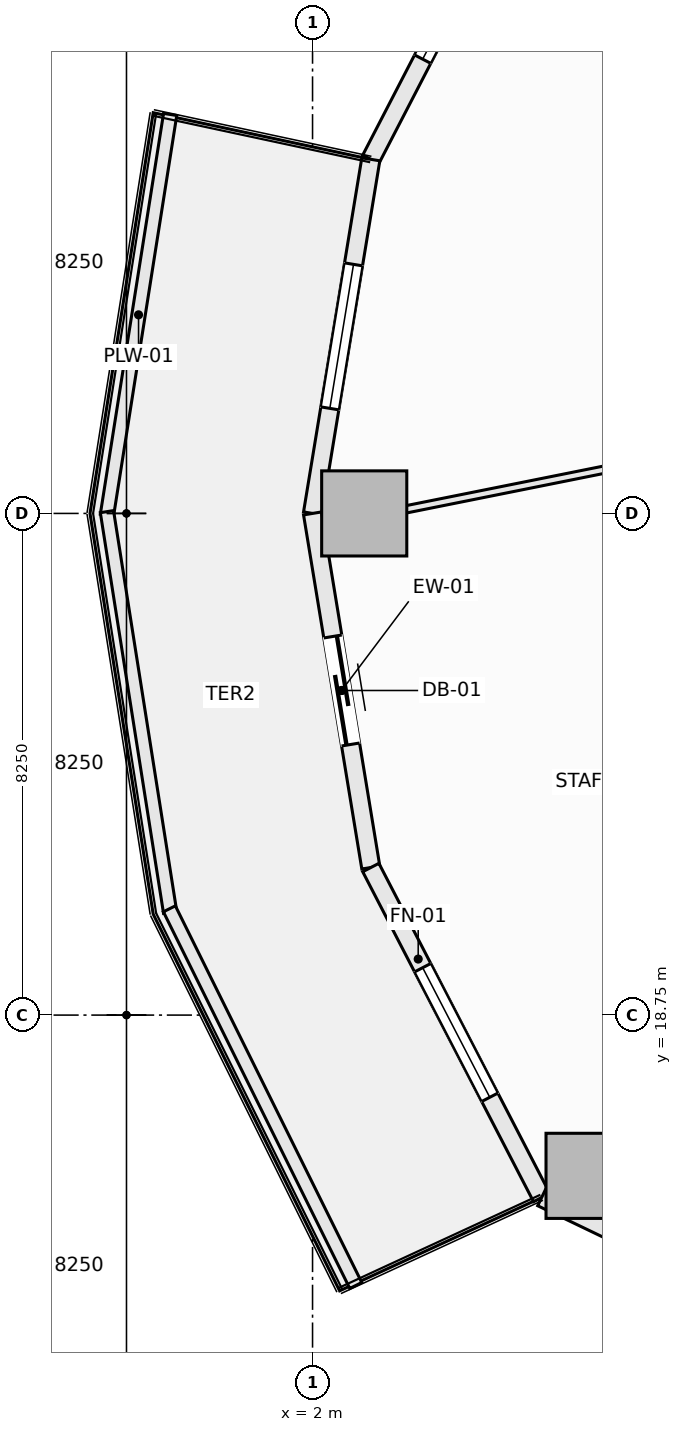
"""IFC4 building model, lengths in metres.
Left out: names, types, materials, properties, quantities, classifications, styles, units other than length and angle.
Written with IfcOpenShell. Run it as: python <this file> out.ifc"""

import sys

from ifc_helpers import new_model, si_unit, direction, frame, frame_2d, origin, origin_2d, place, context, subcontext, project, spatial, rectangle, extrude, element, fill, save


model = new_model("IFC4")
c1 = context("Model", 3, precision=1e-05, world=origin(), true_north=direction((0.0, 1.0)))
c2 = subcontext(c1, "Body", "Model", "MODEL_VIEW")
j1 = project(units=[si_unit("LENGTHUNIT", "METRE"), si_unit("PLANEANGLEUNIT", "RADIAN")], contexts=[c1])
p1 = place(None, origin())
s1 = spatial("IfcSite", under=j1, at=p1, CompositionType="ELEMENT")
p2 = place(p1, origin())
s2 = spatial("IfcBuilding", under=s1, at=p2, CompositionType="ELEMENT")
p3 = place(p2, frame((0.0, 0.0, 49.6)))
s3 = spatial("IfcBuildingStorey", under=s2, at=p3, CompositionType="ELEMENT", Elevation=49.6)
for number, where, z_axis, x_axis in (
    (1, (2.85, 27.0, -0.28), (0.0, 0.0, 1.0), (1.0, 0.0, 0.0)),
    (2, (6.54, 16.106, -0.28), (0.0, 0.0, 1.0), (1.0, 0.0, 0.0)),
):
    element("IfcColumn", number, at=place(p3, frame(where, z_axis=z_axis, x_axis=x_axis)), inside=s3, PredefinedType="COLUMN", context=c2, shape_type="SweptSolid", body=[
        extrude(rectangle(XDim=1.4, YDim=1.4, at=origin_2d()), origin(), (0.0, 0.0, 1.0), 3.85),
    ])
p4 = place(p3, frame((2.958, 32.823, 0.0), z_axis=(0.0, 0.0, 1.0), x_axis=(0.459809804413, 0.88801742312, 0.0)))
e3 = element("IfcWall", 3, at=p4, inside=s3, PredefinedType="SOLIDWALL", context=c2, shape_type="SweptSolid", body=[
    extrude(rectangle(XDim=6.111, YDim=0.3, at=frame_2d((3.055, 0.0))), origin(), (0.0, 0.0, 1.0), 3.093),
])
p5 = place(p4, frame((1.855, 0.0, 0.85)))
e4 = element("IfcOpeningElement", 4, at=p5, cuts=e3, PredefinedType="OPENING", context=c2, shape_type="SweptSolid", body=[
    extrude(rectangle(XDim=2.4, YDim=1.9, at=frame_2d((1.2, 0.95))), frame((0.0, 0.16, 0.0), z_axis=(0.0, -1.0, 0.0), x_axis=(1.0, 0.0, 0.0)), (0.0, 0.0, 1.0), 0.32),
])
p6 = place(p3, frame((2.0, 27.0, 0.0), z_axis=(0.0, 0.0, 1.0), x_axis=(0.162366057843, 0.98673059305, 0.0)))
e5 = element("IfcWall", 5, at=p6, inside=s3, PredefinedType="SOLIDWALL", context=c2, shape_type="SweptSolid", body=[
    extrude(rectangle(XDim=5.902, YDim=0.3, at=frame_2d((2.951, 0.0))), origin(), (0.0, 0.0, 1.0), 3.093),
])
p7 = place(p6, frame((1.751, 0.0, 0.85)))
e6 = element("IfcOpeningElement", 6, at=p7, cuts=e5, PredefinedType="OPENING", context=c2, shape_type="SweptSolid", body=[
    extrude(rectangle(XDim=2.4, YDim=1.9, at=frame_2d((1.2, 0.95))), frame((0.0, 0.16, 0.0), z_axis=(0.0, -1.0, 0.0), x_axis=(1.0, 0.0, 0.0)), (0.0, 0.0, 1.0), 0.32),
])
p8 = place(p3, frame((2.0, 27.0, 0.0), z_axis=(0.0, 0.0, 1.0), x_axis=(0.162366057843, -0.98673059305, 0.0)))
e7 = element("IfcWall", 7, at=p8, inside=s3, PredefinedType="SOLIDWALL", context=c2, shape_type="SweptSolid", body=[
    extrude(rectangle(XDim=5.902, YDim=0.3, at=frame_2d((2.951, 0.0))), origin(), (0.0, 0.0, 1.0), 3.093),
])
p9 = place(p8, frame((2.051, 0.0, 0.0)))
e8 = element("IfcOpeningElement", 8, at=p9, cuts=e7, PredefinedType="OPENING", context=c2, shape_type="SweptSolid", body=[
    extrude(rectangle(XDim=1.8, YDim=2.25, at=frame_2d((0.9, 1.125))), frame((0.0, 0.16, 0.0), z_axis=(0.0, -1.0, 0.0), x_axis=(1.0, 0.0, 0.0)), (0.0, 0.0, 1.0), 0.32),
])
p10 = place(p3, frame((2.958, 21.177, 0.0), z_axis=(0.0, 0.0, 1.0), x_axis=(0.459809804413, -0.88801742312, 0.0)))
e9 = element("IfcWall", 9, at=p10, inside=s3, PredefinedType="SOLIDWALL", context=c2, shape_type="SweptSolid", body=[
    extrude(rectangle(XDim=6.111, YDim=0.3, at=frame_2d((3.055, 0.0))), origin(), (0.0, 0.0, 1.0), 3.093),
])
p11 = place(p10, frame((1.855, 0.0, 0.85)))
e10 = element("IfcOpeningElement", 10, at=p11, cuts=e9, PredefinedType="OPENING", context=c2, shape_type="SweptSolid", body=[
    extrude(rectangle(XDim=2.4, YDim=1.9, at=frame_2d((1.2, 0.95))), frame((0.0, 0.16, 0.0), z_axis=(0.0, -1.0, 0.0), x_axis=(1.0, 0.0, 0.0)), (0.0, 0.0, 1.0), 0.32),
])
p12 = place(p3, frame((5.768, 15.75, 0.0), z_axis=(0.0, 0.0, 1.0), x_axis=(0.901360393999, -0.433069786673, 0.0)))
e11 = element("IfcWall", 11, at=p12, inside=s3, PredefinedType="SOLIDWALL", context=c2, shape_type="SweptSolid", body=[
    extrude(rectangle(XDim=6.842, YDim=0.3, at=frame_2d((3.421, 0.0))), origin(), (0.0, 0.0, 1.0), 3.093),
])
p13 = place(p12, frame((2.221, 0.0, 0.85)))
e12 = element("IfcOpeningElement", 12, at=p13, cuts=e11, PredefinedType="OPENING", context=c2, shape_type="SweptSolid", body=[
    extrude(rectangle(XDim=2.4, YDim=1.9, at=frame_2d((1.2, 0.95))), frame((0.0, 0.16, 0.0), z_axis=(0.0, -1.0, 0.0), x_axis=(1.0, 0.0, 0.0)), (0.0, 0.0, 1.0), 0.32),
])
for number, where, z_axis, x_axis in (
    (13, (-1.382, 26.971, 0.0), (0.0, 0.0, 1.0), (0.156, 0.988, 0.0)),
    (14, (-1.382, 27.029, 0.0), (0.0, 0.0, 1.0), (0.156, -0.988, 0.0)),
):
    element("IfcWall", number, at=place(p3, frame(where, z_axis=z_axis, x_axis=x_axis)), inside=s3, PredefinedType="PARAPET", context=c2, shape_type="SweptSolid", body=[
        extrude(rectangle(XDim=6.672, YDim=0.22, at=frame_2d((3.336, 0.0))), origin(), (0.0, 0.0, 1.0), 0.52),
    ])
p14 = place(p3, frame((-0.354, 20.498, 0.0), z_axis=(0.0, 0.0, 1.0), x_axis=(0.443578479433, -0.8962355341, 0.0)))
e15 = element("IfcWall", 15, at=p14, inside=s3, PredefinedType="PARAPET", context=c2, shape_type="SweptSolid", body=[
    extrude(rectangle(XDim=6.911, YDim=0.22, at=frame_2d((3.456, 0.0))), origin(), (0.0, 0.0, 1.0), 0.52),
])
p15 = place(p3, frame((2.188, 26.796, 0.0), z_axis=(0.0, 0.0, 1.0), x_axis=(0.980506966672, 0.196484320768, 0.0)))
e16 = element("IfcWall", 16, at=p15, inside=s3, PredefinedType="PARTITIONING", context=c2, shape_type="SweptSolid", body=[
    extrude(rectangle(XDim=11.476, YDim=0.12, at=frame_2d((5.738, 0.0))), origin(), (0.0, 0.0, 1.0), 2.362),
])
p16 = place(p5, origin())
e17 = element("IfcWindow", 17, at=p16, inside=s3, PartitioningType="SINGLE_PANEL", PredefinedType="WINDOW", context=c2, shape_type="SweptSolid", body=[
    extrude(rectangle(XDim=2.4, YDim=1.9, at=frame_2d((1.2, 0.95))), frame((0.0, 0.03, 0.0), z_axis=(0.0, -1.0, 0.0), x_axis=(1.0, 0.0, 0.0)), (0.0, 0.0, 1.0), 0.06),
])
fill(e4, e17)
p17 = place(p7, origin())
e18 = element("IfcWindow", 18, at=p17, inside=s3, PartitioningType="SINGLE_PANEL", PredefinedType="WINDOW", context=c2, shape_type="SweptSolid", body=[
    extrude(rectangle(XDim=2.4, YDim=1.9, at=frame_2d((1.2, 0.95))), frame((0.0, 0.03, 0.0), z_axis=(0.0, -1.0, 0.0), x_axis=(1.0, 0.0, 0.0)), (0.0, 0.0, 1.0), 0.06),
])
fill(e6, e18)
p18 = place(p9, frame((1.8, 0.0, 0.0), z_axis=(0.0, 0.0, 1.0), x_axis=(-1.0, 0.0, 0.0)))
e19 = element("IfcDoor", 19, at=p18, inside=s3, OperationType="SLIDING_TO_LEFT", PredefinedType="DOOR", context=c2, shape_type="SweptSolid", body=[
    extrude(rectangle(XDim=1.8, YDim=2.25, at=frame_2d((0.9, 1.125))), frame((0.0, 0.025, 0.0), z_axis=(0.0, -1.0, 0.0), x_axis=(1.0, 0.0, 0.0)), (0.0, 0.0, 1.0), 0.05),
])
fill(e8, e19)
p19 = place(p11, origin())
e20 = element("IfcWindow", 20, at=p19, inside=s3, PartitioningType="SINGLE_PANEL", PredefinedType="WINDOW", context=c2, shape_type="SweptSolid", body=[
    extrude(rectangle(XDim=2.4, YDim=1.9, at=frame_2d((1.2, 0.95))), frame((0.0, 0.03, 0.0), z_axis=(0.0, -1.0, 0.0), x_axis=(1.0, 0.0, 0.0)), (0.0, 0.0, 1.0), 0.06),
])
fill(e10, e20)
save(model, sys.argv[1])
